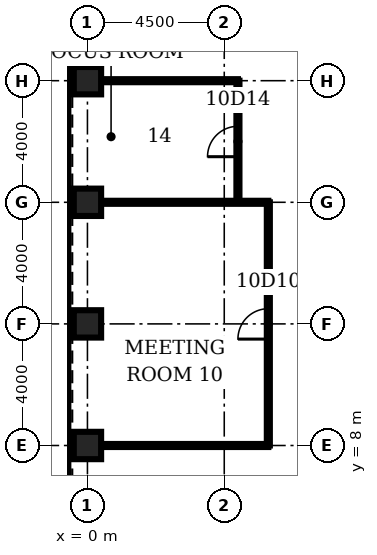
"""IFC4 building model, lengths in metres.
Left out: names, types, materials, properties, quantities, classifications, styles, units other than length and angle.
Written with IfcOpenShell. Run it as: python <this file> out.ifc"""

import sys

from ifc_helpers import new_model, si_unit, direction, frame, frame_2d, origin, origin_2d, place, context, subcontext, project, spatial, rectangle, hollow_rectangle, extrude, element, fill, save


model = new_model("IFC4")
c1 = context("Model", 3, precision=1e-05, world=origin(), true_north=direction((0.0, 1.0)))
c2 = subcontext(c1, "Body", "Model", "MODEL_VIEW")
j1 = project(units=[si_unit("LENGTHUNIT", "METRE"), si_unit("PLANEANGLEUNIT", "RADIAN")], contexts=[c1])
p1 = place(None, origin())
s1 = spatial("IfcSite", under=j1, at=p1, CompositionType="ELEMENT")
p2 = place(p1, origin())
s2 = spatial("IfcBuilding", under=s1, at=p2, CompositionType="ELEMENT")
p3 = place(p2, frame((0.0, 0.0, 50.0)))
s3 = spatial("IfcBuildingStorey", under=s2, at=p3, CompositionType="ELEMENT", Elevation=50.0)
for number, where, z_axis, x_axis in (
    (1, (0.0, 20.0, 0.0), (0.0, 0.0, 1.0), (1.0, 0.0, 0.0)),
    (2, (0.0, 16.0, 0.0), (0.0, 0.0, 1.0), (1.0, 0.0, 0.0)),
    (3, (0.0, 12.0, 0.0), (0.0, 0.0, 1.0), (1.0, 0.0, 0.0)),
    (4, (0.0, 8.0, 0.0), (0.0, 0.0, 1.0), (1.0, 0.0, 0.0)),
):
    element("IfcColumn", number, at=place(p3, frame(where, z_axis=z_axis, x_axis=x_axis)), inside=s3, PredefinedType="COLUMN", context=c2, shape_type="SweptSolid", body=[
        extrude(hollow_rectangle(XDim=0.9, YDim=0.9, WallThickness=0.12, at=origin_2d()), origin(), (0.0, 0.0, 1.0), 4.5),
    ])
for number, where, z_axis, x_axis in (
    (5, (0.45, 8.0, 0.0), (0.0, 0.0, 1.0), (1.0, 0.0, 0.0)),
    (6, (0.45, 16.0, 0.0), (0.0, 0.0, 1.0), (1.0, 0.0, 0.0)),
):
    element("IfcWall", number, at=place(p3, frame(where, z_axis=z_axis, x_axis=x_axis)), inside=s3, PredefinedType="PARTITIONING", context=c2, shape_type="SweptSolid", body=[
        extrude(rectangle(XDim=5.5, YDim=0.1, at=frame_2d((2.75, 0.0))), origin(), (0.0, 0.0, 1.0), 3.0),
    ])
p4 = place(p3, frame((0.45, 20.0, 0.0), z_axis=(0.0, 0.0, 1.0), x_axis=(1.0, 0.0, 0.0)))
e7 = element("IfcWall", 7, at=p4, inside=s3, PredefinedType="PARTITIONING", context=c2, shape_type="SweptSolid", body=[
    extrude(rectangle(XDim=4.5, YDim=0.1, at=frame_2d((2.25, 0.0))), origin(), (0.0, 0.0, 1.0), 3.0),
])
p5 = place(p3, frame((4.95, 16.0, 0.0), z_axis=(0.0, 0.0, 1.0), x_axis=(0.0, 1.0, 0.0)))
e8 = element("IfcWall", 8, at=p5, inside=s3, PredefinedType="PARTITIONING", context=c2, shape_type="SweptSolid", body=[
    extrude(rectangle(XDim=4.0, YDim=0.1, at=frame_2d((2.0, 0.0))), origin(), (0.0, 0.0, 1.0), 3.0),
])
p6 = place(p5, frame((1.5, 0.0, 0.0)))
e9 = element("IfcOpeningElement", 9, at=p6, cuts=e8, PredefinedType="OPENING", context=c2, shape_type="SweptSolid", body=[
    extrude(rectangle(XDim=1.0, YDim=2.1, at=frame_2d((0.5, 1.05))), frame((0.0, 0.06, 0.0), z_axis=(0.0, -1.0, 0.0), x_axis=(1.0, 0.0, 0.0)), (0.0, 0.0, 1.0), 0.12),
])
p7 = place(p3, frame((5.95, 8.0, 0.0), z_axis=(0.0, 0.0, 1.0), x_axis=(0.0, 1.0, 0.0)))
e10 = element("IfcWall", 10, at=p7, inside=s3, PredefinedType="PARTITIONING", context=c2, shape_type="SweptSolid", body=[
    extrude(rectangle(XDim=8.0, YDim=0.1, at=frame_2d((4.0, 0.0))), origin(), (0.0, 0.0, 1.0), 3.0),
])
p8 = place(p7, frame((3.5, 0.0, 0.0)))
e11 = element("IfcOpeningElement", 11, at=p8, cuts=e10, PredefinedType="OPENING", context=c2, shape_type="SweptSolid", body=[
    extrude(rectangle(XDim=1.0, YDim=2.1, at=frame_2d((0.5, 1.05))), frame((0.0, 0.06, 0.0), z_axis=(0.0, -1.0, 0.0), x_axis=(1.0, 0.0, 0.0)), (0.0, 0.0, 1.0), 0.12),
])
p9 = place(p8, origin())
e12 = element("IfcDoor", 12, at=p9, inside=s3, OperationType="SINGLE_SWING_LEFT", PredefinedType="DOOR", context=c2, shape_type="SweptSolid", body=[
    extrude(rectangle(XDim=1.0, YDim=2.1, at=frame_2d((0.5, 1.05))), frame((0.0, 0.025, 0.0), z_axis=(0.0, -1.0, 0.0), x_axis=(1.0, 0.0, 0.0)), (0.0, 0.0, 1.0), 0.05),
])
fill(e11, e12)
p10 = place(p6, origin())
e13 = element("IfcDoor", 13, at=p10, inside=s3, OperationType="SINGLE_SWING_LEFT", PredefinedType="DOOR", context=c2, shape_type="SweptSolid", body=[
    extrude(rectangle(XDim=1.0, YDim=2.1, at=frame_2d((0.5, 1.05))), frame((0.0, 0.025, 0.0), z_axis=(0.0, -1.0, 0.0), x_axis=(1.0, 0.0, 0.0)), (0.0, 0.0, 1.0), 0.05),
])
fill(e9, e13)
save(model, sys.argv[1])
